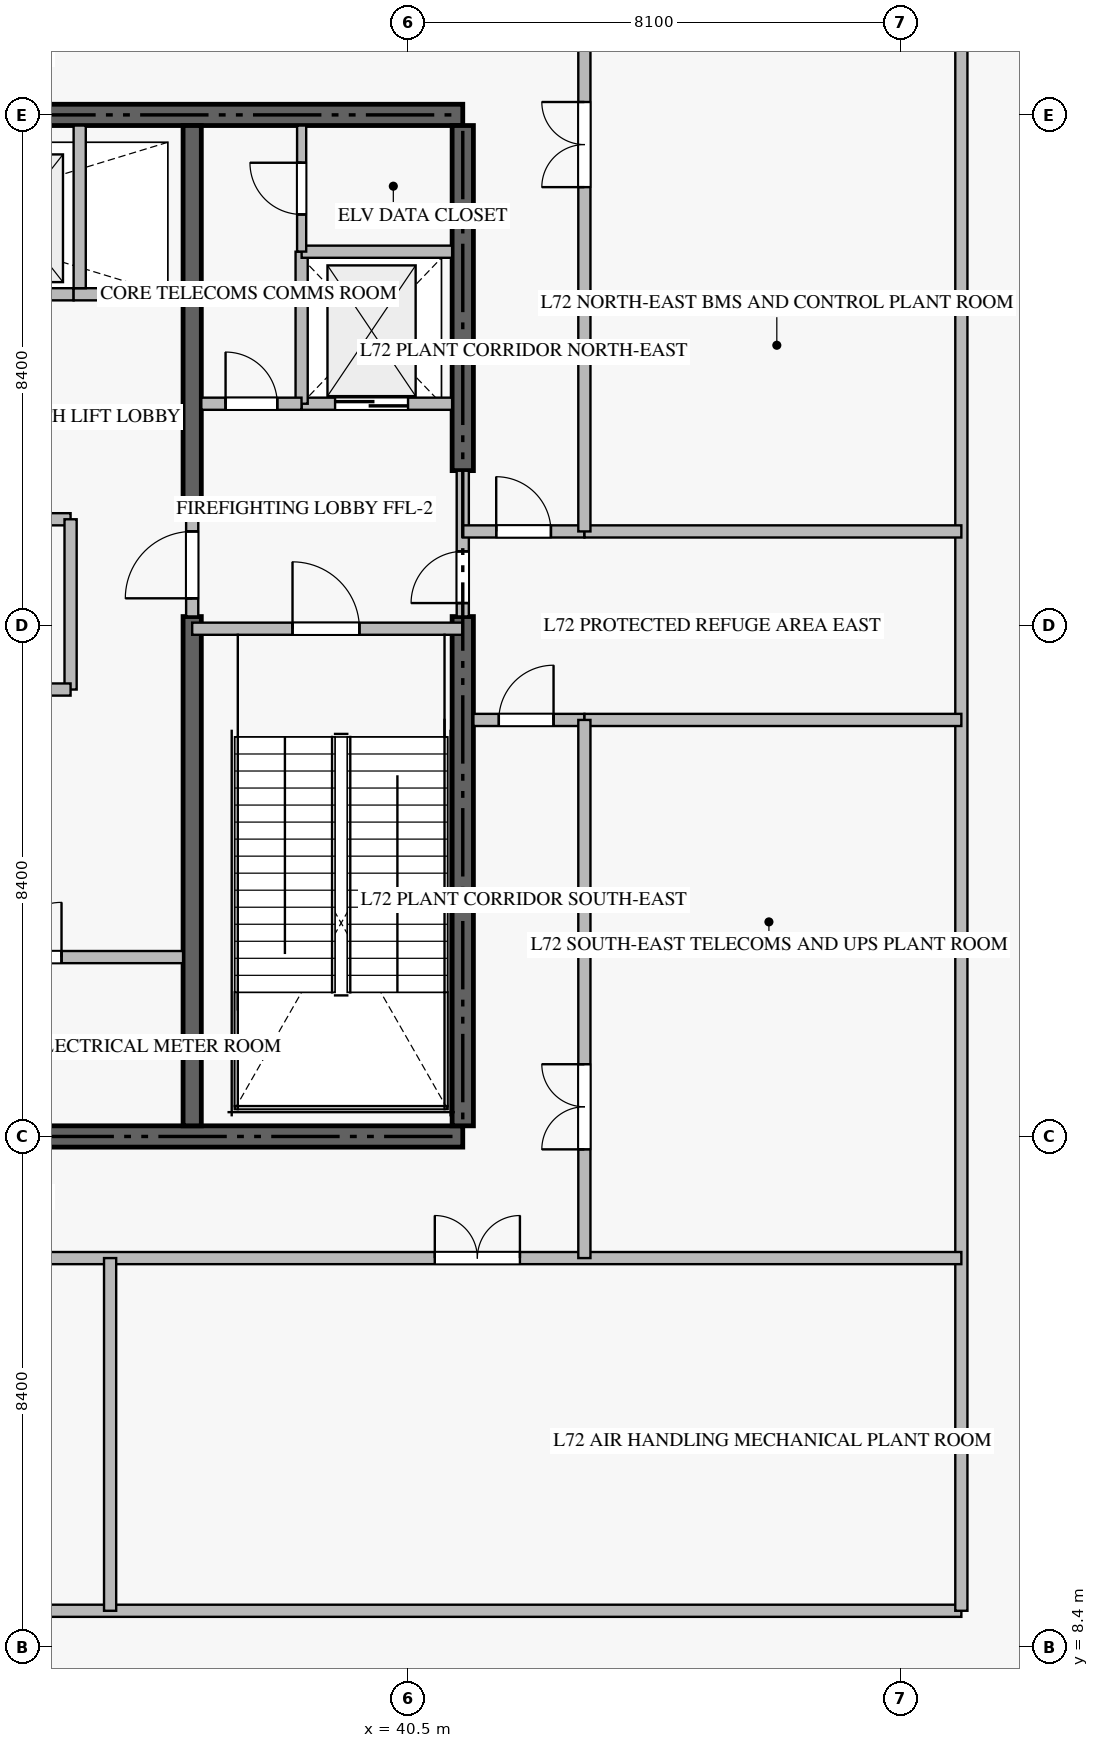
"""IFC4 building model, lengths in metres.
Left out: names, types, materials, properties, quantities, classifications, styles, units other than length and angle.
Written with IfcOpenShell. Run it as: python <this file> out.ifc"""

import sys

from ifc_helpers import new_model, si_unit, direction, frame, frame_2d, origin, place, context, subcontext, project, spatial, rectangle, extrude, source, transform, mapped, element, fill, save


model = new_model("IFC4")
c1 = context("Model", 3, precision=1e-05, world=origin(), true_north=direction((0.0, 1.0)))
c2 = subcontext(c1, "Body", "Model", "MODEL_VIEW")
j1 = project(units=[si_unit("LENGTHUNIT", "METRE"), si_unit("PLANEANGLEUNIT", "RADIAN")], contexts=[c1])
p1 = place(None, origin())
s1 = spatial("IfcSite", under=j1, at=p1, CompositionType="ELEMENT")
p2 = place(p1, origin())
s2 = spatial("IfcBuilding", under=s1, at=p2, CompositionType="ELEMENT")
p3 = place(p2, frame((0.0, 0.0, 287.45)))
s3 = spatial("IfcBuildingStorey", under=s2, at=p3, CompositionType="ELEMENT", Elevation=287.45)
for number, where, z_axis, x_axis in (
    (1, (23.4, 16.8, -0.44), (0.0, 0.0, 1.0), (1.0, 0.0, 0.0)),
    (2, (41.4, 33.6, -0.44), (0.0, 0.0, 1.0), (-1.0, 0.0, 0.0)),
):
    element("IfcWall", number, at=place(p3, frame(where, z_axis=z_axis, x_axis=x_axis)), inside=s3, PredefinedType="SHEAR", context=c2, shape_type="SweptSolid", body=[
        extrude(rectangle(XDim=18.0, YDim=0.35, at=frame_2d((9.0, 0.0))), origin(), (0.0, 0.0, 1.0), 6.178),
    ])
p4 = place(p3, frame((41.4, 16.975, -0.44), z_axis=(0.0, 0.0, 1.0), x_axis=(0.0, 1.0, 0.0)))
e3 = element("IfcWall", 3, at=p4, inside=s3, PredefinedType="SHEAR", context=c2, shape_type="SweptSolid", body=[
    extrude(rectangle(XDim=8.375, YDim=0.35, at=frame_2d((4.188, 0.0))), origin(), (0.0, 0.0, 1.0), 6.178),
])
p5 = place(p3, frame((41.4, 27.75, -0.44), z_axis=(0.0, 0.0, 1.0), x_axis=(0.0, 1.0, 0.0)))
e4 = element("IfcWall", 4, at=p5, inside=s3, PredefinedType="SHEAR", context=c2, shape_type="SweptSolid", body=[
    extrude(rectangle(XDim=5.675, YDim=0.35, at=frame_2d((2.837, 0.0))), origin(), (0.0, 0.0, 1.0), 6.178),
])
p6 = place(p3, frame((36.95, 16.975, -0.44), z_axis=(0.0, 0.0, 1.0), x_axis=(0.0, 1.0, 0.0)))
e5 = element("IfcWall", 5, at=p6, inside=s3, PredefinedType="SHEAR", context=c2, shape_type="SweptSolid", body=[
    extrude(rectangle(XDim=8.375, YDim=0.3, at=frame_2d((4.188, 0.0))), origin(), (0.0, 0.0, 1.0), 6.178),
])
p7 = place(p3, frame((36.95, 27.05, -0.44), z_axis=(0.0, 0.0, 1.0), x_axis=(0.0, 1.0, 0.0)))
e6 = element("IfcWall", 6, at=p7, inside=s3, PredefinedType="SHEAR", context=c2, shape_type="SweptSolid", body=[
    extrude(rectangle(XDim=6.375, YDim=0.3, at=frame_2d((3.188, 0.0))), origin(), (0.0, 0.0, 1.0), 6.178),
])
p8 = place(p3, frame((36.95, 25.15, 0.0), z_axis=(0.0, 0.0, 1.0), x_axis=(1.0, 0.0, 0.0)))
e7 = element("IfcWall", 7, at=p8, inside=s3, PredefinedType="STANDARD", context=c2, shape_type="SweptSolid", body=[
    extrude(rectangle(XDim=4.45, YDim=0.2, at=frame_2d((2.225, 0.0))), origin(), (0.0, 0.0, 1.0), 5.74),
])
p9 = place(p8, frame((1.65, 0.0, 0.0)))
e8 = element("IfcOpeningElement", 8, at=p9, cuts=e7, PredefinedType="OPENING", context=c2, shape_type="SweptSolid", body=[
    extrude(rectangle(XDim=1.1, YDim=2.15, at=frame_2d((0.55, 1.075))), frame((0.0, 0.11, 0.0), z_axis=(0.0, -1.0, 0.0), x_axis=(1.0, 0.0, 0.0)), (0.0, 0.0, 1.0), 0.22),
])
p10 = place(p3, frame((38.75, 28.85, 0.0), z_axis=(0.0, 0.0, 1.0), x_axis=(1.0, 0.0, 0.0)))
e9 = element("IfcWall", 9, at=p10, inside=s3, PredefinedType="STANDARD", context=c2, shape_type="SweptSolid", body=[
    extrude(rectangle(XDim=2.475, YDim=0.2, at=frame_2d((1.238, 0.0))), origin(), (0.0, 0.0, 1.0), 5.74),
])
p11 = place(p10, frame((0.55, 0.0, 0.0)))
e10 = element("IfcOpeningElement", 10, at=p11, cuts=e9, PredefinedType="OPENING", context=c2, shape_type="SweptSolid", body=[
    extrude(rectangle(XDim=1.2, YDim=2.2, at=frame_2d((0.6, 1.1))), frame((0.0, 0.11, 0.0), z_axis=(0.0, -1.0, 0.0), x_axis=(1.0, 0.0, 0.0)), (0.0, 0.0, 1.0), 0.22),
])
p12 = place(p3, frame((32.85, 30.65, 0.0), z_axis=(0.0, 0.0, 1.0), x_axis=(1.0, 0.0, 0.0)))
e11 = element("IfcWall", 11, at=p12, inside=s3, PredefinedType="STANDARD", context=c2, shape_type="SweptSolid", body=[
    extrude(rectangle(XDim=2.15, YDim=0.2, at=frame_2d((1.075, 0.0))), origin(), (0.0, 0.0, 1.0), 5.74),
])
p13 = place(p12, frame((0.6, 0.0, 0.0)))
e12 = element("IfcOpeningElement", 12, at=p13, cuts=e11, PredefinedType="OPENING", context=c2, shape_type="SweptSolid", body=[
    extrude(rectangle(XDim=1.1, YDim=2.2, at=frame_2d((0.55, 1.1))), frame((0.0, 0.11, 0.0), z_axis=(0.0, -1.0, 0.0), x_axis=(1.0, 0.0, 0.0)), (0.0, 0.0, 1.0), 0.22),
])
p14 = place(p3, frame((35.0, 30.65, 0.0), z_axis=(0.0, 0.0, 1.0), x_axis=(1.0, 0.0, 0.0)))
e13 = element("IfcWall", 13, at=p14, inside=s3, PredefinedType="STANDARD", context=c2, shape_type="SweptSolid", body=[
    extrude(rectangle(XDim=1.8, YDim=0.2, at=frame_2d((0.9, 0.0))), origin(), (0.0, 0.0, 1.0), 5.74),
])
p15 = place(p3, frame((35.1, 30.75, 0.0), z_axis=(0.0, 0.0, 1.0), x_axis=(0.0, 1.0, 0.0)))
e14 = element("IfcWall", 14, at=p15, inside=s3, PredefinedType="STANDARD", context=c2, shape_type="SweptSolid", body=[
    extrude(rectangle(XDim=2.675, YDim=0.2, at=frame_2d((1.337, 0.0))), origin(), (0.0, 0.0, 1.0), 5.74),
])
p16 = place(p3, frame((38.75, 28.85, 0.0), z_axis=(0.0, 0.0, 1.0), x_axis=(0.0, 1.0, 0.0)))
e15 = element("IfcWall", 15, at=p16, inside=s3, PredefinedType="STANDARD", context=c2, shape_type="SweptSolid", body=[
    extrude(rectangle(XDim=2.5, YDim=0.2, at=frame_2d((1.25, 0.0))), origin(), (0.0, 0.0, 1.0), 5.74),
])
p17 = place(p3, frame((38.75, 31.35, 0.0), z_axis=(0.0, 0.0, 1.0), x_axis=(1.0, 0.0, 0.0)))
e16 = element("IfcWall", 16, at=p17, inside=s3, PredefinedType="STANDARD", context=c2, shape_type="SweptSolid", body=[
    extrude(rectangle(XDim=2.475, YDim=0.2, at=frame_2d((1.238, 0.0))), origin(), (0.0, 0.0, 1.0), 5.74),
])
p18 = place(p3, frame((37.1, 28.85, 0.0), z_axis=(0.0, 0.0, 1.0), x_axis=(1.0, 0.0, 0.0)))
e17 = element("IfcWall", 17, at=p18, inside=s3, PredefinedType="STANDARD", context=c2, shape_type="SweptSolid", body=[
    extrude(rectangle(XDim=1.648, YDim=0.2, at=frame_2d((0.824, 0.0))), origin(), (0.0, 0.0, 1.0), 5.74),
])
p19 = place(p18, frame((0.399, 0.0, 0.0)))
e18 = element("IfcOpeningElement", 18, at=p19, cuts=e17, PredefinedType="OPENING", context=c2, shape_type="SweptSolid", body=[
    extrude(rectangle(XDim=0.85, YDim=2.1, at=frame_2d((0.425, 1.05))), frame((0.0, 0.11, 0.0), z_axis=(0.0, -1.0, 0.0), x_axis=(1.0, 0.0, 0.0)), (0.0, 0.0, 1.0), 0.22),
])
p20 = place(p3, frame((41.4, 25.352, 0.0), z_axis=(0.0, 0.0, 1.0), x_axis=(0.0, 1.0, 0.0)))
e19 = element("IfcWall", 19, at=p20, inside=s3, PredefinedType="STANDARD", context=c2, shape_type="SweptSolid", body=[
    extrude(rectangle(XDim=2.396, YDim=0.2, at=frame_2d((1.198, 0.0))), origin(), (0.0, 0.0, 1.0), 5.74),
])
p21 = place(p20, frame((0.22, 0.0, 0.0)))
e20 = element("IfcOpeningElement", 20, at=p21, cuts=e19, PredefinedType="OPENING", context=c2, shape_type="SweptSolid", body=[
    extrude(rectangle(XDim=0.85, YDim=2.1, at=frame_2d((0.425, 1.05))), frame((0.0, 0.11, 0.0), z_axis=(0.0, -1.0, 0.0), x_axis=(1.0, 0.0, 0.0)), (0.0, 0.0, 1.0), 0.22),
])
p22 = place(p3, frame((36.95, 25.352, 0.0), z_axis=(0.0, 0.0, 1.0), x_axis=(0.0, 1.0, 0.0)))
e21 = element("IfcWall", 21, at=p22, inside=s3, PredefinedType="STANDARD", context=c2, shape_type="SweptSolid", body=[
    extrude(rectangle(XDim=1.696, YDim=0.2, at=frame_2d((0.848, 0.0))), origin(), (0.0, 0.0, 1.0), 5.74),
])
p23 = place(p22, frame((0.298, 0.0, 0.0)))
e22 = element("IfcOpeningElement", 22, at=p23, cuts=e21, PredefinedType="OPENING", context=c2, shape_type="SweptSolid", body=[
    extrude(rectangle(XDim=1.1, YDim=2.15, at=frame_2d((0.55, 1.075))), frame((0.0, 0.11, 0.0), z_axis=(0.0, -1.0, 0.0), x_axis=(1.0, 0.0, 0.0)), (0.0, 0.0, 1.0), 0.22),
])
p24 = place(p3, frame((38.75, 31.352, 0.0), z_axis=(0.0, 0.0, 1.0), x_axis=(0.0, 1.0, 0.0)))
e23 = element("IfcWall", 23, at=p24, inside=s3, PredefinedType="PARTITIONING", context=c2, shape_type="SweptSolid", body=[
    extrude(rectangle(XDim=2.073, YDim=0.15, at=frame_2d((1.037, 0.0))), origin(), (0.0, 0.0, 1.0), 5.74),
])
p25 = place(p24, frame((0.611, 0.0, 0.0)))
e24 = element("IfcOpeningElement", 24, at=p25, cuts=e23, PredefinedType="OPENING", context=c2, shape_type="SweptSolid", body=[
    extrude(rectangle(XDim=0.85, YDim=2.1, at=frame_2d((0.425, 1.05))), frame((0.0, 0.085, 0.0), z_axis=(0.0, -1.0, 0.0), x_axis=(1.0, 0.0, 0.0)), (0.0, 0.0, 1.0), 0.17),
])
p26 = place(p3, frame((31.902, 19.75, 0.0), z_axis=(0.0, 0.0, 1.0), x_axis=(1.0, 0.0, 0.0)))
e25 = element("IfcWall", 25, at=p26, inside=s3, PredefinedType="STANDARD", context=c2, shape_type="SweptSolid", body=[
    extrude(rectangle(XDim=4.898, YDim=0.2, at=frame_2d((2.449, 0.0))), origin(), (0.0, 0.0, 1.0), 5.74),
])
p27 = place(p26, frame((1.999, 0.0, 0.0)))
e26 = element("IfcOpeningElement", 26, at=p27, cuts=e25, PredefinedType="OPENING", context=c2, shape_type="SweptSolid", body=[
    extrude(rectangle(XDim=0.9, YDim=2.1, at=frame_2d((0.45, 1.05))), frame((0.0, 0.11, 0.0), z_axis=(0.0, -1.0, 0.0), x_axis=(1.0, 0.0, 0.0)), (0.0, 0.0, 1.0), 0.22),
])
p28 = place(p3, frame((28.0, 26.95, 0.0), z_axis=(0.0, 0.0, 1.0), x_axis=(1.0, 0.0, 0.0)))
e27 = element("IfcWall", 27, at=p28, inside=s3, PredefinedType="STANDARD", context=c2, shape_type="SweptSolid", body=[
    extrude(rectangle(XDim=6.95, YDim=0.2, at=frame_2d((3.475, 0.0))), origin(), (0.0, 0.0, 1.0), 5.74),
])
p29 = place(p3, frame((34.95, 24.15, 0.0), z_axis=(0.0, 0.0, 1.0), x_axis=(0.0, 1.0, 0.0)))
e28 = element("IfcWall", 28, at=p29, inside=s3, PredefinedType="STANDARD", context=c2, shape_type="SweptSolid", body=[
    extrude(rectangle(XDim=2.8, YDim=0.2, at=frame_2d((1.4, 0.0))), origin(), (0.0, 0.0, 1.0), 5.74),
])
p30 = place(p3, frame((28.0, 24.15, 0.0), z_axis=(0.0, 0.0, 1.0), x_axis=(1.0, 0.0, 0.0)))
e29 = element("IfcWall", 29, at=p30, inside=s3, PredefinedType="STANDARD", context=c2, shape_type="SweptSolid", body=[
    extrude(rectangle(XDim=6.95, YDim=0.2, at=frame_2d((3.475, 0.0))), origin(), (0.0, 0.0, 1.0), 5.74),
])
p31 = place(p30, frame((3.025, 0.0, 0.0)))
e30 = element("IfcOpeningElement", 30, at=p31, cuts=e29, PredefinedType="OPENING", context=c2, shape_type="SweptSolid", body=[
    extrude(rectangle(XDim=0.9, YDim=2.1, at=frame_2d((0.45, 1.05))), frame((0.0, 0.11, 0.0), z_axis=(0.0, -1.0, 0.0), x_axis=(1.0, 0.0, 0.0)), (0.0, 0.0, 1.0), 0.22),
])
p32 = place(p3, frame((15.2, 9.0, 0.0), z_axis=(0.0, 0.0, 1.0), x_axis=(1.0, 0.0, 0.0)))
e31 = element("IfcWall", 31, at=p32, inside=s3, PredefinedType="STANDARD", context=c2, shape_type="SweptSolid", body=[
    extrude(rectangle(XDim=34.4, YDim=0.2, at=frame_2d((17.2, 0.0))), origin(), (0.0, 0.0, 1.0), 5.74),
])
p33 = place(p3, frame((49.6, 9.0, 0.0), z_axis=(0.0, 0.0, 1.0), x_axis=(0.0, 1.0, 0.0)))
e32 = element("IfcWall", 32, at=p33, inside=s3, PredefinedType="STANDARD", context=c2, shape_type="SweptSolid", body=[
    extrude(rectangle(XDim=32.4, YDim=0.2, at=frame_2d((16.2, 0.0))), origin(), (0.0, 0.0, 1.0), 5.74),
])
p34 = place(p3, frame((41.575, 23.65, 0.0), z_axis=(0.0, 0.0, 1.0), x_axis=(1.0, 0.0, 0.0)))
e33 = element("IfcWall", 33, at=p34, inside=s3, PredefinedType="STANDARD", context=c2, shape_type="SweptSolid", body=[
    extrude(rectangle(XDim=1.825, YDim=0.2, at=frame_2d((0.913, 0.0))), origin(), (0.0, 0.0, 1.0), 5.74),
])
p35 = place(p34, frame((0.418, 0.0, 0.0)))
e34 = element("IfcOpeningElement", 34, at=p35, cuts=e33, PredefinedType="OPENING", context=c2, shape_type="SweptSolid", body=[
    extrude(rectangle(XDim=0.9, YDim=2.1, at=frame_2d((0.45, 1.05))), frame((0.0, 0.11, 0.0), z_axis=(0.0, -1.0, 0.0), x_axis=(1.0, 0.0, 0.0)), (0.0, 0.0, 1.0), 0.22),
])
p36 = place(p3, frame((43.402, 23.65, 0.0), z_axis=(0.0, 0.0, 1.0), x_axis=(1.0, 0.0, 0.0)))
e35 = element("IfcWall", 35, at=p36, inside=s3, PredefinedType="STANDARD", context=c2, shape_type="SweptSolid", body=[
    extrude(rectangle(XDim=6.198, YDim=0.2, at=frame_2d((3.099, 0.0))), origin(), (0.0, 0.0, 1.0), 5.74),
])
p37 = place(p3, frame((41.4, 26.75, 0.0), z_axis=(0.0, 0.0, 1.0), x_axis=(1.0, 0.0, 0.0)))
e36 = element("IfcWall", 36, at=p37, inside=s3, PredefinedType="STANDARD", context=c2, shape_type="SweptSolid", body=[
    extrude(rectangle(XDim=2.0, YDim=0.2, at=frame_2d((1.0, 0.0))), origin(), (0.0, 0.0, 1.0), 5.74),
])
p38 = place(p37, frame((0.55, 0.0, 0.0)))
e37 = element("IfcOpeningElement", 37, at=p38, cuts=e36, PredefinedType="OPENING", context=c2, shape_type="SweptSolid", body=[
    extrude(rectangle(XDim=0.9, YDim=2.1, at=frame_2d((0.45, 1.05))), frame((0.0, 0.11, 0.0), z_axis=(0.0, -1.0, 0.0), x_axis=(1.0, 0.0, 0.0)), (0.0, 0.0, 1.0), 0.22),
])
p39 = place(p3, frame((43.402, 26.75, 0.0), z_axis=(0.0, 0.0, 1.0), x_axis=(1.0, 0.0, 0.0)))
e38 = element("IfcWall", 38, at=p39, inside=s3, PredefinedType="STANDARD", context=c2, shape_type="SweptSolid", body=[
    extrude(rectangle(XDim=6.198, YDim=0.2, at=frame_2d((3.099, 0.0))), origin(), (0.0, 0.0, 1.0), 5.74),
])
p40 = place(p3, frame((15.2, 14.8, 0.0), z_axis=(0.0, 0.0, 1.0), x_axis=(1.0, 0.0, 0.0)))
e39 = element("IfcWall", 39, at=p40, inside=s3, PredefinedType="STANDARD", context=c2, shape_type="SweptSolid", body=[
    extrude(rectangle(XDim=34.4, YDim=0.2, at=frame_2d((17.2, 0.0))), origin(), (0.0, 0.0, 1.0), 5.74),
])
p41 = place(p40, frame((7.26, 0.0, 0.0)))
e40 = element("IfcOpeningElement", 40, at=p41, cuts=e39, PredefinedType="OPENING", context=c2, shape_type="SweptSolid", body=[
    extrude(rectangle(XDim=1.4, YDim=2.2, at=frame_2d((0.7, 1.1))), frame((0.0, 0.11, 0.0), z_axis=(0.0, -1.0, 0.0), x_axis=(1.0, 0.0, 0.0)), (0.0, 0.0, 1.0), 0.22),
])
p42 = place(p40, frame((25.74, 0.0, 0.0)))
e41 = element("IfcOpeningElement", 41, at=p42, cuts=e39, PredefinedType="OPENING", context=c2, shape_type="SweptSolid", body=[
    extrude(rectangle(XDim=1.4, YDim=2.2, at=frame_2d((0.7, 1.1))), frame((0.0, 0.11, 0.0), z_axis=(0.0, -1.0, 0.0), x_axis=(1.0, 0.0, 0.0)), (0.0, 0.0, 1.0), 0.22),
])
p43 = place(p3, frame((35.6, 9.0, 0.0), z_axis=(0.0, 0.0, 1.0), x_axis=(0.0, 1.0, 0.0)))
e42 = element("IfcWall", 42, at=p43, inside=s3, PredefinedType="STANDARD", context=c2, shape_type="SweptSolid", body=[
    extrude(rectangle(XDim=5.8, YDim=0.2, at=frame_2d((2.9, 0.0))), origin(), (0.0, 0.0, 1.0), 5.74),
])
p44 = place(p3, frame((43.4, 14.8, 0.0), z_axis=(0.0, 0.0, 1.0), x_axis=(0.0, 1.0, 0.0)))
e43 = element("IfcWall", 43, at=p44, inside=s3, PredefinedType="STANDARD", context=c2, shape_type="SweptSolid", body=[
    extrude(rectangle(XDim=8.85, YDim=0.2, at=frame_2d((4.425, 0.0))), origin(), (0.0, 0.0, 1.0), 5.74),
])
p45 = place(p44, frame((1.788, 0.0, 0.0)))
e44 = element("IfcOpeningElement", 44, at=p45, cuts=e43, PredefinedType="OPENING", context=c2, shape_type="SweptSolid", body=[
    extrude(rectangle(XDim=1.4, YDim=2.2, at=frame_2d((0.7, 1.1))), frame((0.0, 0.11, 0.0), z_axis=(0.0, -1.0, 0.0), x_axis=(1.0, 0.0, 0.0)), (0.0, 0.0, 1.0), 0.22),
])
p46 = place(p3, frame((43.4, 26.75, 0.0), z_axis=(0.0, 0.0, 1.0), x_axis=(0.0, 1.0, 0.0)))
e45 = element("IfcWall", 45, at=p46, inside=s3, PredefinedType="STANDARD", context=c2, shape_type="SweptSolid", body=[
    extrude(rectangle(XDim=8.85, YDim=0.2, at=frame_2d((4.425, 0.0))), origin(), (0.0, 0.0, 1.0), 5.74),
])
p47 = place(p46, frame((5.662, 0.0, 0.0)))
e46 = element("IfcOpeningElement", 46, at=p47, cuts=e45, PredefinedType="OPENING", context=c2, shape_type="SweptSolid", body=[
    extrude(rectangle(XDim=1.4, YDim=2.2, at=frame_2d((0.7, 1.1))), frame((0.0, 0.11, 0.0), z_axis=(0.0, -1.0, 0.0), x_axis=(1.0, 0.0, 0.0)), (0.0, 0.0, 1.0), 0.22),
])
m1 = source(origin(), c2, "Body", "SweptSolid", [
    extrude(rectangle(XDim=1.1, YDim=2.15, at=frame_2d((0.55, 1.075))), frame((0.0, 0.025, 0.0), z_axis=(0.0, -1.0, 0.0), x_axis=(1.0, 0.0, 0.0)), (0.0, 0.0, 1.0), 0.05),
])
p48 = place(p9, origin())
e47 = element("IfcDoor", 47, at=p48, inside=s3, OperationType="SINGLE_SWING_LEFT", PredefinedType="DOOR", context=c2, shape_type="MappedRepresentation", body=[
    mapped(m1, transform((0.0, 0.0, 0.0), scale=1.0)),
])
fill(e8, e47)
m2 = source(origin(), c2, "Body", "SweptSolid", [
    extrude(rectangle(XDim=1.2, YDim=2.2, at=frame_2d((0.6, 1.1))), frame((0.0, 0.025, 0.0), z_axis=(0.0, -1.0, 0.0), x_axis=(1.0, 0.0, 0.0)), (0.0, 0.0, 1.0), 0.05),
])
p49 = place(p11, origin())
e48 = element("IfcDoor", 48, at=p49, inside=s3, OperationType="DOUBLE_DOOR_SLIDING", PredefinedType="DOOR", context=c2, shape_type="MappedRepresentation", body=[
    mapped(m2, transform((0.0, 0.0, 0.0), scale=1.0)),
])
fill(e10, e48)
m3 = source(origin(), c2, "Body", "SweptSolid", [
    extrude(rectangle(XDim=0.85, YDim=2.1, at=frame_2d((0.425, 1.05))), frame((0.0, 0.025, 0.0), z_axis=(0.0, -1.0, 0.0), x_axis=(1.0, 0.0, 0.0)), (0.0, 0.0, 1.0), 0.05),
])
p50 = place(p19, origin())
e49 = element("IfcDoor", 49, at=p50, inside=s3, OperationType="SINGLE_SWING_LEFT", PredefinedType="DOOR", context=c2, shape_type="MappedRepresentation", body=[
    mapped(m3, transform((0.0, 0.0, 0.0), scale=1.0)),
])
fill(e18, e49)
p51 = place(p21, origin())
e50 = element("IfcDoor", 50, at=p51, inside=s3, OperationType="SINGLE_SWING_LEFT", PredefinedType="DOOR", context=c2, shape_type="MappedRepresentation", body=[
    mapped(m3, transform((0.0, 0.0, 0.0), scale=1.0)),
])
fill(e20, e50)
p52 = place(p23, origin())
e51 = element("IfcDoor", 51, at=p52, inside=s3, OperationType="SINGLE_SWING_LEFT", PredefinedType="DOOR", context=c2, shape_type="MappedRepresentation", body=[
    mapped(m1, transform((0.0, 0.0, 0.0), scale=1.0)),
])
fill(e22, e51)
p53 = place(p25, origin())
e52 = element("IfcDoor", 52, at=p53, inside=s3, OperationType="SINGLE_SWING_RIGHT", PredefinedType="DOOR", context=c2, shape_type="MappedRepresentation", body=[
    mapped(m3, transform((0.0, 0.0, 0.0), scale=1.0)),
])
fill(e24, e52)
m4 = source(origin(), c2, "Body", "SweptSolid", [
    extrude(rectangle(XDim=0.9, YDim=2.1, at=frame_2d((0.45, 1.05))), frame((0.0, 0.025, 0.0), z_axis=(0.0, -1.0, 0.0), x_axis=(1.0, 0.0, 0.0)), (0.0, 0.0, 1.0), 0.05),
])
p54 = place(p27, origin())
e53 = element("IfcDoor", 53, at=p54, inside=s3, OperationType="SINGLE_SWING_RIGHT", PredefinedType="DOOR", context=c2, shape_type="MappedRepresentation", body=[
    mapped(m4, transform((0.0, 0.0, 0.0), scale=1.0)),
])
fill(e26, e53)
p55 = place(p35, origin())
e54 = element("IfcDoor", 54, at=p55, inside=s3, OperationType="SINGLE_SWING_RIGHT", PredefinedType="DOOR", context=c2, shape_type="MappedRepresentation", body=[
    mapped(m4, transform((0.0, 0.0, 0.0), scale=1.0)),
])
fill(e34, e54)
p56 = place(p38, origin())
e55 = element("IfcDoor", 55, at=p56, inside=s3, OperationType="SINGLE_SWING_LEFT", PredefinedType="DOOR", context=c2, shape_type="MappedRepresentation", body=[
    mapped(m4, transform((0.0, 0.0, 0.0), scale=1.0)),
])
fill(e37, e55)
m5 = source(origin(), c2, "Body", "SweptSolid", [
    extrude(rectangle(XDim=1.4, YDim=2.2, at=frame_2d((0.7, 1.1))), frame((0.0, 0.025, 0.0), z_axis=(0.0, -1.0, 0.0), x_axis=(1.0, 0.0, 0.0)), (0.0, 0.0, 1.0), 0.05),
])
p57 = place(p42, origin())
e56 = element("IfcDoor", 56, at=p57, inside=s3, OperationType="DOUBLE_DOOR_SINGLE_SWING", PredefinedType="DOOR", context=c2, shape_type="MappedRepresentation", body=[
    mapped(m5, transform((0.0, 0.0, 0.0), scale=1.0)),
])
fill(e41, e56)
p58 = place(p45, origin())
e57 = element("IfcDoor", 57, at=p58, inside=s3, OperationType="DOUBLE_DOOR_SINGLE_SWING", PredefinedType="DOOR", context=c2, shape_type="MappedRepresentation", body=[
    mapped(m5, transform((0.0, 0.0, 0.0), scale=1.0)),
])
fill(e44, e57)
p59 = place(p47, origin())
e58 = element("IfcDoor", 58, at=p59, inside=s3, OperationType="DOUBLE_DOOR_SINGLE_SWING", PredefinedType="DOOR", context=c2, shape_type="MappedRepresentation", body=[
    mapped(m5, transform((0.0, 0.0, 0.0), scale=1.0)),
])
fill(e46, e58)
save(model, sys.argv[1])
